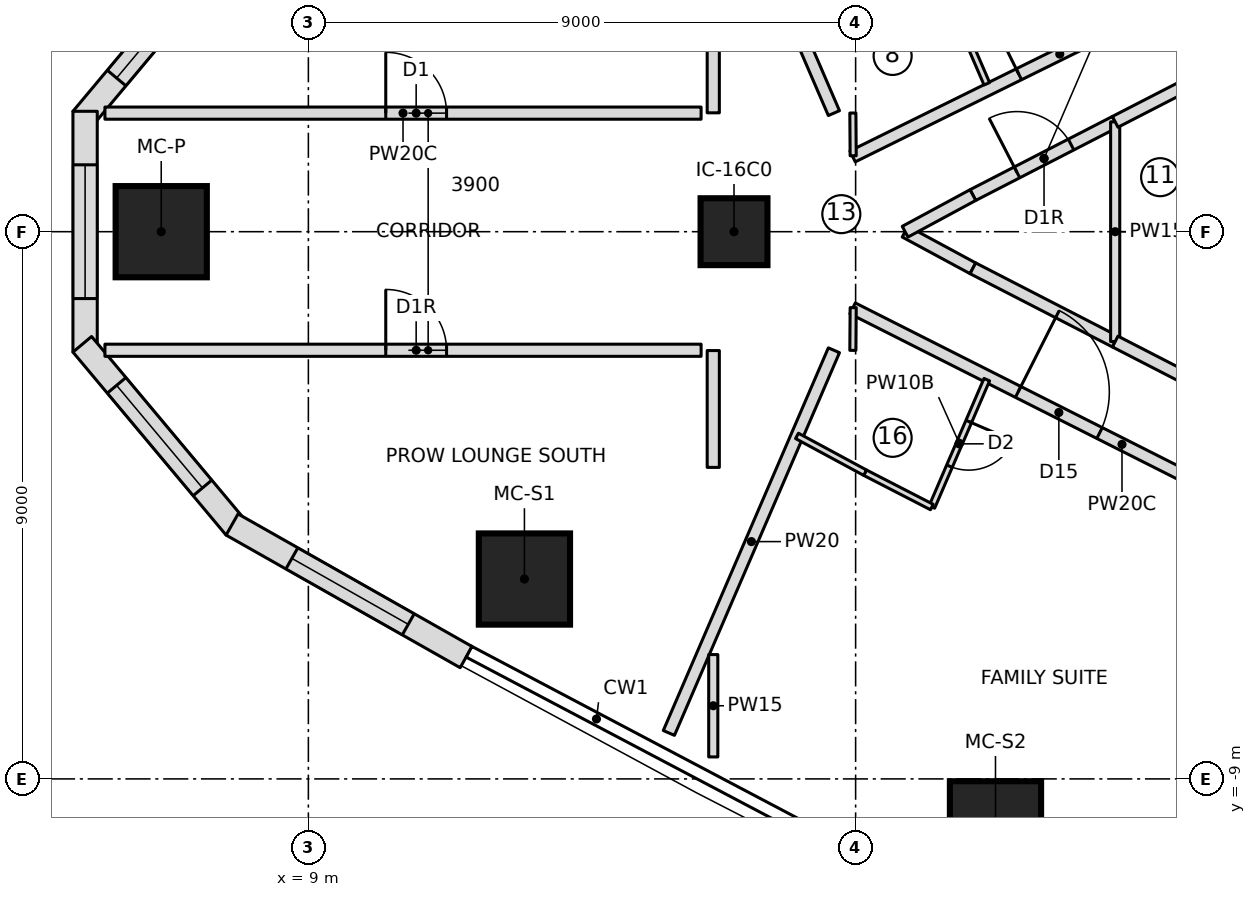
"""IFC4 building model, lengths in metres.
Left out: names, types, materials, properties, quantities, classifications, styles, units other than length and angle.
Written with IfcOpenShell. Run it as: python <this file> out.ifc"""

import sys

from ifc_helpers import new_model, si_unit, direction, frame, frame_2d, origin, origin_2d, place, context, subcontext, project, spatial, polyline, rectangle, outline, extrude, element, fill, save


model = new_model("IFC4")
c1 = context("Model", 3, precision=1e-05, world=origin(), true_north=direction((0.0, 1.0)))
c2 = subcontext(c1, "Body", "Model", "MODEL_VIEW")
j1 = project(units=[si_unit("LENGTHUNIT", "METRE"), si_unit("PLANEANGLEUNIT", "RADIAN")], contexts=[c1])
p1 = place(None, origin())
s1 = spatial("IfcSite", under=j1, at=p1, CompositionType="ELEMENT")
p2 = place(p1, origin())
s2 = spatial("IfcBuilding", under=s1, at=p2, CompositionType="ELEMENT")
p3 = place(p2, frame((0.0, 0.0, 130.2)))
s3 = spatial("IfcBuildingStorey", under=s2, at=p3, CompositionType="ELEMENT", Elevation=130.2)
for number, where, z_axis, x_axis in (
    (1, (6.58, 0.0, 0.0), (0.0, 0.0, 1.0), (1.0, 0.0, 0.0)),
    (2, (12.553, -5.713, 0.0), (0.0, 0.0, 1.0), (1.0, 0.0, 0.0)),
    (3, (20.3, -9.788, 0.0), (0.0, 0.0, 1.0), (1.0, 0.0, 0.0)),
):
    element("IfcColumn", number, at=place(p3, frame(where, z_axis=z_axis, x_axis=x_axis)), inside=s3, PredefinedType="COLUMN", context=c2, shape_type="SweptSolid", body=[
        extrude(rectangle(XDim=1.5, YDim=1.5, at=origin_2d()), origin(), (0.0, 0.0, 1.0), 3.55),
    ])
p4 = place(p3, frame((16.0, 0.0, 0.0), z_axis=(0.0, 0.0, 1.0), x_axis=(1.0, 0.0, 0.0)))
e4 = element("IfcColumn", 4, at=p4, inside=s3, PredefinedType="COLUMN", context=c2, shape_type="SweptSolid", body=[
    extrude(rectangle(XDim=1.1, YDim=1.1, at=origin_2d()), origin(), (0.0, 0.0, 1.0), 3.55),
])
p5 = place(p3, frame((7.777, 4.834, 0.0), z_axis=(0.0, 0.0, 1.0), x_axis=(-0.641787918235, -0.766882173484, 0.0)))
e5 = element("IfcWall", 5, at=p5, inside=s3, PredefinedType="NOTDEFINED", context=c2, shape_type="SweptSolid", body=[
    extrude(outline(polyline([(-0.036, -0.2), (3.888, -0.2), (3.743, 0.2), (0.036, 0.2), (-0.036, -0.2)])), origin(), (0.0, 0.0, 1.0), 3.25),
])
p6 = place(p5, frame((0.808, 0.0, 0.6)))
e6 = element("IfcOpeningElement", 6, at=p6, cuts=e5, PredefinedType="OPENING", context=c2, shape_type="SweptSolid", body=[
    extrude(outline(polyline([(0.0, 1.35), (0.084, 1.771), (0.322, 2.128), (0.679, 2.366), (1.1, 2.45), (1.521, 2.366), (1.878, 2.128), (2.116, 1.771), (2.2, 1.35), (2.2, 1.1), (2.116, 0.679), (1.878, 0.322), (1.521, 0.084), (1.1, 0.0), (0.679, 0.084), (0.322, 0.322), (0.084, 0.679), (0.0, 1.1), (0.0, 1.35)])), frame((0.0, 0.21, 0.0), z_axis=(0.0, -1.0, 0.0), x_axis=(1.0, 0.0, 0.0)), (0.0, 0.0, 1.0), 0.42),
])
p7 = place(p3, frame((5.328, 1.908, 0.0), z_axis=(0.0, 0.0, 1.0), x_axis=(0.0, -1.0, 0.0)))
e7 = element("IfcWall", 7, at=p7, inside=s3, PredefinedType="NOTDEFINED", context=c2, shape_type="SweptSolid", body=[
    extrude(outline(polyline([(-0.073, -0.2), (3.888, -0.2), (3.743, 0.2), (0.073, 0.2), (-0.073, -0.2)])), origin(), (0.0, 0.0, 1.0), 3.25),
])
p8 = place(p7, frame((0.808, 0.0, 0.6)))
e8 = element("IfcOpeningElement", 8, at=p8, cuts=e7, PredefinedType="OPENING", context=c2, shape_type="SweptSolid", body=[
    extrude(outline(polyline([(0.0, 1.35), (0.084, 1.771), (0.322, 2.128), (0.679, 2.366), (1.1, 2.45), (1.521, 2.366), (1.878, 2.128), (2.116, 1.771), (2.2, 1.35), (2.2, 1.1), (2.116, 0.679), (1.878, 0.322), (1.521, 0.084), (1.1, 0.0), (0.679, 0.084), (0.322, 0.322), (0.084, 0.679), (0.0, 1.1), (0.0, 1.35)])), frame((0.0, 0.21, 0.0), z_axis=(0.0, -1.0, 0.0), x_axis=(1.0, 0.0, 0.0)), (0.0, 0.0, 1.0), 0.42),
])
p9 = place(p3, frame((5.328, -1.908, 0.0), z_axis=(0.0, 0.0, 1.0), x_axis=(0.641787918235, -0.766882173484, 0.0)))
e9 = element("IfcWall", 9, at=p9, inside=s3, PredefinedType="NOTDEFINED", context=c2, shape_type="SweptSolid", body=[
    extrude(outline(polyline([(-0.073, -0.2), (3.852, -0.2), (3.779, 0.2), (0.073, 0.2), (-0.073, -0.2)])), origin(), (0.0, 0.0, 1.0), 3.25),
])
p10 = place(p9, frame((0.808, 0.0, 0.6)))
e10 = element("IfcOpeningElement", 10, at=p10, cuts=e9, PredefinedType="OPENING", context=c2, shape_type="SweptSolid", body=[
    extrude(outline(polyline([(0.0, 1.35), (0.084, 1.771), (0.322, 2.128), (0.679, 2.366), (1.1, 2.45), (1.521, 2.366), (1.878, 2.128), (2.116, 1.771), (2.2, 1.35), (2.2, 1.1), (2.116, 0.679), (1.878, 0.322), (1.521, 0.084), (1.1, 0.0), (0.679, 0.084), (0.322, 0.322), (0.084, 0.679), (0.0, 1.1), (0.0, 1.35)])), frame((0.0, 0.21, 0.0), z_axis=(0.0, -1.0, 0.0), x_axis=(1.0, 0.0, 0.0)), (0.0, 0.0, 1.0), 0.42),
])
p11 = place(p3, frame((7.777, -4.834, 0.0), z_axis=(0.0, 0.0, 1.0), x_axis=(0.870045255208, -0.492971859125, 0.0)))
e11 = element("IfcWall", 11, at=p11, inside=s3, PredefinedType="NOTDEFINED", context=c2, shape_type="SweptSolid", body=[
    extrude(outline(polyline([(-0.036, -0.2), (4.388, -0.2), (4.388, 0.2), (0.036, 0.2), (-0.036, -0.2)])), origin(), (0.0, 0.0, 1.0), 3.25),
])
p12 = place(p11, frame((1.094, 0.0, 0.6)))
e12 = element("IfcOpeningElement", 12, at=p12, cuts=e11, PredefinedType="OPENING", context=c2, shape_type="SweptSolid", body=[
    extrude(outline(polyline([(0.0, 1.35), (0.084, 1.771), (0.322, 2.128), (0.679, 2.366), (1.1, 2.45), (1.521, 2.366), (1.878, 2.128), (2.116, 1.771), (2.2, 1.35), (2.2, 1.1), (2.116, 0.679), (1.878, 0.322), (1.521, 0.084), (1.1, 0.0), (0.679, 0.084), (0.322, 0.322), (0.084, 0.679), (0.0, 1.1), (0.0, 1.35)])), frame((0.0, 0.21, 0.0), z_axis=(0.0, -1.0, 0.0), x_axis=(1.0, 0.0, 0.0)), (0.0, 0.0, 1.0), 0.42),
])
p13 = place(p3, frame((5.654, 1.95, 0.0), z_axis=(0.0, 0.0, 1.0), x_axis=(1.0, 0.0, 0.0)))
e13 = element("IfcWall", 13, at=p13, inside=s3, PredefinedType="PARTITIONING", context=c2, shape_type="SweptSolid", body=[
    extrude(rectangle(XDim=9.804, YDim=0.2, at=frame_2d((4.902, 0.0))), origin(), (0.0, 0.0, 1.0), 3.25),
])
p14 = place(p13, frame((4.618, 0.0, 0.0)))
e14 = element("IfcOpeningElement", 14, at=p14, cuts=e13, PredefinedType="OPENING", context=c2, shape_type="SweptSolid", body=[
    extrude(rectangle(XDim=1.0, YDim=2.1, at=frame_2d((0.5, 1.05))), frame((0.0, 0.11, 0.0), z_axis=(0.0, -1.0, 0.0), x_axis=(1.0, 0.0, 0.0)), (0.0, 0.0, 1.0), 0.22),
])
p15 = place(p3, frame((5.654, -1.95, 0.0), z_axis=(0.0, 0.0, 1.0), x_axis=(1.0, 0.0, 0.0)))
e15 = element("IfcWall", 15, at=p15, inside=s3, PredefinedType="PARTITIONING", context=c2, shape_type="SweptSolid", body=[
    extrude(rectangle(XDim=9.804, YDim=0.2, at=frame_2d((4.902, 0.0))), origin(), (0.0, 0.0, 1.0), 3.25),
])
p16 = place(p15, frame((4.618, 0.0, 0.0)))
e16 = element("IfcOpeningElement", 16, at=p16, cuts=e15, PredefinedType="OPENING", context=c2, shape_type="SweptSolid", body=[
    extrude(rectangle(XDim=1.0, YDim=2.1, at=frame_2d((0.5, 1.05))), frame((0.0, 0.11, 0.0), z_axis=(0.0, -1.0, 0.0), x_axis=(1.0, 0.0, 0.0)), (0.0, 0.0, 1.0), 0.22),
])
p17 = place(p3, frame((17.643, 1.95, 0.0), z_axis=(0.0, 0.0, 1.0), x_axis=(-0.395994543879, 0.918252863441, 0.0)))
e17 = element("IfcWall", 17, at=p17, inside=s3, PredefinedType="PARTITIONING", context=c2, shape_type="SweptSolid", body=[
    extrude(rectangle(XDim=6.854, YDim=0.2, at=frame_2d((3.427, 0.0))), origin(), (0.0, 0.0, 1.0), 3.25),
])
p18 = place(p3, frame((17.95, 1.238, 0.0), z_axis=(0.0, 0.0, 1.0), x_axis=(0.896593504408, 0.44285447706, 0.0)))
e18 = element("IfcWall", 18, at=p18, inside=s3, PredefinedType="PARTITIONING", context=c2, shape_type="SweptSolid", body=[
    extrude(rectangle(XDim=14.31, YDim=0.2, at=frame_2d((7.155, 0.0))), origin(), (0.0, 0.0, 1.0), 3.25),
])
p19 = place(p18, frame((3.05, 0.0, 0.0)))
e19 = element("IfcOpeningElement", 19, at=p19, cuts=e18, PredefinedType="OPENING", context=c2, shape_type="SweptSolid", body=[
    extrude(rectangle(XDim=1.5, YDim=2.1, at=frame_2d((0.75, 1.05))), frame((0.0, 0.11, 0.0), z_axis=(0.0, -1.0, 0.0), x_axis=(1.0, 0.0, 0.0)), (0.0, 0.0, 1.0), 0.22),
])
p20 = place(p3, frame((19.254, 4.529, 0.0), z_axis=(0.0, 0.0, 1.0), x_axis=(0.395958457437, -0.9182684248, 0.0)))
e20 = element("IfcWall", 20, at=p20, inside=s3, PredefinedType="PARTITIONING", context=c2, shape_type="SweptSolid", body=[
    extrude(rectangle(XDim=2.282, YDim=0.1, at=frame_2d((1.141, 0.0))), origin(), (0.0, 0.0, 1.0), 3.25),
])
p21 = place(p20, frame((0.75, 0.0, 0.0)))
e21 = element("IfcOpeningElement", 21, at=p21, cuts=e20, PredefinedType="OPENING", context=c2, shape_type="SweptSolid", body=[
    extrude(rectangle(XDim=0.8, YDim=2.1, at=frame_2d((0.4, 1.05))), frame((0.0, 0.06, 0.0), z_axis=(0.0, -1.0, 0.0), x_axis=(1.0, 0.0, 0.0)), (0.0, 0.0, 1.0), 0.12),
])
p22 = place(p3, frame((14.929, -8.244, 0.0), z_axis=(0.0, 0.0, 1.0), x_axis=(0.395994543879, 0.918252863441, 0.0)))
e22 = element("IfcWall", 22, at=p22, inside=s3, PredefinedType="PARTITIONING", context=c2, shape_type="SweptSolid", body=[
    extrude(rectangle(XDim=6.854, YDim=0.2, at=frame_2d((3.427, 0.0))), origin(), (0.0, 0.0, 1.0), 3.25),
])
p23 = place(p3, frame((17.95, -1.261, 0.0), z_axis=(0.0, 0.0, 1.0), x_axis=(0.892679126003, -0.450692775623, 0.0)))
e23 = element("IfcWall", 23, at=p23, inside=s3, PredefinedType="PARTITIONING", context=c2, shape_type="SweptSolid", body=[
    extrude(rectangle(XDim=9.927, YDim=0.2, at=frame_2d((4.963, 0.0))), origin(), (0.0, 0.0, 1.0), 3.25),
])
p24 = place(p23, frame((3.05, 0.0, 0.0)))
e24 = element("IfcOpeningElement", 24, at=p24, cuts=e23, PredefinedType="OPENING", context=c2, shape_type="SweptSolid", body=[
    extrude(rectangle(XDim=1.5, YDim=2.1, at=frame_2d((0.75, 1.05))), frame((0.0, 0.11, 0.0), z_axis=(0.0, -1.0, 0.0), x_axis=(1.0, 0.0, 0.0)), (0.0, 0.0, 1.0), 0.22),
])
p25 = place(p3, frame((20.157, -2.433, 0.0), z_axis=(0.0, 0.0, 1.0), x_axis=(-0.395958457437, -0.9182684248, 0.0)))
e25 = element("IfcWall", 25, at=p25, inside=s3, PredefinedType="PARTITIONING", context=c2, shape_type="SweptSolid", body=[
    extrude(rectangle(XDim=2.282, YDim=0.1, at=frame_2d((1.141, 0.0))), origin(), (0.0, 0.0, 1.0), 3.25),
])
p26 = place(p25, frame((0.75, 0.0, 0.0)))
e26 = element("IfcOpeningElement", 26, at=p26, cuts=e25, PredefinedType="OPENING", context=c2, shape_type="SweptSolid", body=[
    extrude(rectangle(XDim=0.8, YDim=2.1, at=frame_2d((0.4, 1.05))), frame((0.0, 0.06, 0.0), z_axis=(0.0, -1.0, 0.0), x_axis=(1.0, 0.0, 0.0)), (0.0, 0.0, 1.0), 0.12),
])
p27 = place(p3, frame((19.253, -4.529, 0.0), z_axis=(0.0, 0.0, 1.0), x_axis=(-0.889106231322, 0.457700895154, 0.0)))
e27 = element("IfcWall", 27, at=p27, inside=s3, PredefinedType="PARTITIONING", context=c2, shape_type="SweptSolid", body=[
    extrude(rectangle(XDim=1.235, YDim=0.1, at=frame_2d((0.617, 0.0))), origin(), (0.0, 0.0, 1.0), 3.25),
])
p28 = place(p3, frame((18.156, -3.963, 0.0), z_axis=(0.0, 0.0, 1.0), x_axis=(-0.879823588489, 0.475300382009, 0.0)))
e28 = element("IfcWall", 28, at=p28, inside=s3, PredefinedType="PARTITIONING", context=c2, shape_type="SweptSolid", body=[
    extrude(rectangle(XDim=1.273, YDim=0.1, at=frame_2d((0.636, 0.0))), origin(), (0.0, 0.0, 1.0), 3.25),
])
p29 = place(p3, frame((19.928, 0.602, 0.0), z_axis=(0.0, 0.0, 1.0), x_axis=(0.889134700325, 0.457645588505, 0.0)))
e29 = element("IfcWall", 29, at=p29, inside=s3, PredefinedType="PARTITIONING", context=c2, shape_type="SweptSolid", body=[
    extrude(rectangle(XDim=2.632, YDim=0.2, at=frame_2d((1.316, 0.0))), origin(), (0.0, 0.0, 1.0), 3.25),
])
p30 = place(p29, frame((0.816, 0.0, 0.0)))
e30 = element("IfcOpeningElement", 30, at=p30, cuts=e29, PredefinedType="OPENING", context=c2, shape_type="SweptSolid", body=[
    extrude(rectangle(XDim=1.0, YDim=2.1, at=frame_2d((0.5, 1.05))), frame((0.0, 0.11, 0.0), z_axis=(0.0, -1.0, 0.0), x_axis=(1.0, 0.0, 0.0)), (0.0, 0.0, 1.0), 0.22),
])
for number, where, z_axis, x_axis in (
    (31, (19.928, -0.602, 0.0), (0.0, 0.0, 1.0), (-0.88, 0.475, 0.0)),
    (32, (18.814, 0.0, 0.0), (0.0, 0.0, 1.0), (0.88, 0.475, 0.0)),
):
    element("IfcWall", number, at=place(p3, frame(where, z_axis=z_axis, x_axis=x_axis)), inside=s3, PredefinedType="PARTITIONING", context=c2, shape_type="SweptSolid", body=[
        extrude(rectangle(XDim=1.267, YDim=0.2, at=frame_2d((0.633, 0.0))), origin(), (0.0, 0.0, 1.0), 3.25),
    ])
p31 = place(p3, frame((22.269, -1.807, 0.0), z_axis=(0.0, 0.0, 1.0), x_axis=(-0.889134700325, 0.457645588505, 0.0)))
e33 = element("IfcWall", 33, at=p31, inside=s3, PredefinedType="PARTITIONING", context=c2, shape_type="SweptSolid", body=[
    extrude(rectangle(XDim=2.632, YDim=0.2, at=frame_2d((1.316, 0.0))), origin(), (0.0, 0.0, 1.0), 3.25),
])
p32 = place(p3, frame((22.269, -1.807, 0.0), z_axis=(0.0, 0.0, 1.0), x_axis=(0.0, 1.0, 0.0)))
e34 = element("IfcWall", 34, at=p32, inside=s3, PredefinedType="PARTITIONING", context=c2, shape_type="SweptSolid", body=[
    extrude(rectangle(XDim=3.613, YDim=0.15, at=frame_2d((1.807, 0.0))), origin(), (0.0, 0.0, 1.0), 3.25),
])
for number, where, z_axis, x_axis in (
    (35, (23.659, -2.522, 0.0), (0.0, 0.0, 1.0), (-0.889, 0.458, 0.0)),
    (36, (22.269, 1.807, 0.0), (0.0, 0.0, 1.0), (0.889, 0.458, 0.0)),
):
    element("IfcWall", number, at=place(p3, frame(where, z_axis=z_axis, x_axis=x_axis)), inside=s3, PredefinedType="PARTITIONING", context=c2, shape_type="SweptSolid", body=[
        extrude(rectangle(XDim=1.563, YDim=0.2, at=frame_2d((0.782, 0.0))), origin(), (0.0, 0.0, 1.0), 3.25),
    ])
p33 = place(p3, frame((15.659, -6.955, 0.0), z_axis=(0.0, 0.0, 1.0), x_axis=(0.0, -1.0, 0.0)))
e37 = element("IfcWall", 37, at=p33, inside=s3, PredefinedType="PARTITIONING", context=c2, shape_type="SweptSolid", body=[
    extrude(rectangle(XDim=1.684, YDim=0.15, at=frame_2d((0.842, 0.0))), origin(), (0.0, 0.0, 1.0), 3.25),
])
for number, where, z_axis, x_axis in (
    (38, (17.96, 1.249, 0.0), (0.0, 0.0, 1.0), (-0.007, 1.0, 0.0)),
    (39, (17.955, -1.952, 0.0), (0.0, 0.0, 1.0), (0.007, 1.0, 0.0)),
):
    element("IfcWall", number, at=place(p3, frame(where, z_axis=z_axis, x_axis=x_axis)), inside=s3, PredefinedType="PARTITIONING", context=c2, shape_type="SweptSolid", body=[
        extrude(rectangle(XDim=0.703, YDim=0.1, at=frame_2d((0.352, 0.0))), origin(), (0.0, 0.0, 1.0), 3.25),
    ])
p34 = place(p3, frame((15.659, 3.869, 0.0), z_axis=(0.0, 0.0, 1.0), x_axis=(0.0, -1.0, 0.0)))
e40 = element("IfcWall", 40, at=p34, inside=s3, PredefinedType="PARTITIONING", context=c2, shape_type="SweptSolid", body=[
    extrude(rectangle(XDim=1.914, YDim=0.2, at=frame_2d((0.957, 0.0))), origin(), (0.0, 0.0, 1.0), 3.25),
])
p35 = place(p3, frame((15.659, -1.955, 0.0), z_axis=(0.0, 0.0, 1.0), x_axis=(0.0, -1.0, 0.0)))
e41 = element("IfcWall", 41, at=p35, inside=s3, PredefinedType="PARTITIONING", context=c2, shape_type="SweptSolid", body=[
    extrude(rectangle(XDim=1.922, YDim=0.2, at=frame_2d((0.961, 0.0))), origin(), (0.0, 0.0, 1.0), 3.25),
])
p36 = place(p6, origin())
e42 = element("IfcWindow", 42, at=p36, inside=s3, PartitioningType="SINGLE_PANEL", PredefinedType="WINDOW", context=c2, shape_type="SweptSolid", body=[
    extrude(outline(polyline([(0.0, 1.35), (0.084, 1.771), (0.322, 2.128), (0.679, 2.366), (1.1, 2.45), (1.521, 2.366), (1.878, 2.128), (2.116, 1.771), (2.2, 1.35), (2.2, 1.1), (2.116, 0.679), (1.878, 0.322), (1.521, 0.084), (1.1, 0.0), (0.679, 0.084), (0.322, 0.322), (0.084, 0.679), (0.0, 1.1), (0.0, 1.35)])), frame((0.0, 0.17, 0.0), z_axis=(0.0, -1.0, 0.0), x_axis=(1.0, 0.0, 0.0)), (0.0, 0.0, 1.0), 0.06),
])
fill(e6, e42)
p37 = place(p8, origin())
e43 = element("IfcWindow", 43, at=p37, inside=s3, PartitioningType="SINGLE_PANEL", PredefinedType="WINDOW", context=c2, shape_type="SweptSolid", body=[
    extrude(outline(polyline([(0.0, 1.35), (0.084, 1.771), (0.322, 2.128), (0.679, 2.366), (1.1, 2.45), (1.521, 2.366), (1.878, 2.128), (2.116, 1.771), (2.2, 1.35), (2.2, 1.1), (2.116, 0.679), (1.878, 0.322), (1.521, 0.084), (1.1, 0.0), (0.679, 0.084), (0.322, 0.322), (0.084, 0.679), (0.0, 1.1), (0.0, 1.35)])), frame((0.0, 0.17, 0.0), z_axis=(0.0, -1.0, 0.0), x_axis=(1.0, 0.0, 0.0)), (0.0, 0.0, 1.0), 0.06),
])
fill(e8, e43)
p38 = place(p10, origin())
e44 = element("IfcWindow", 44, at=p38, inside=s3, PartitioningType="SINGLE_PANEL", PredefinedType="WINDOW", context=c2, shape_type="SweptSolid", body=[
    extrude(outline(polyline([(0.0, 1.35), (0.084, 1.771), (0.322, 2.128), (0.679, 2.366), (1.1, 2.45), (1.521, 2.366), (1.878, 2.128), (2.116, 1.771), (2.2, 1.35), (2.2, 1.1), (2.116, 0.679), (1.878, 0.322), (1.521, 0.084), (1.1, 0.0), (0.679, 0.084), (0.322, 0.322), (0.084, 0.679), (0.0, 1.1), (0.0, 1.35)])), frame((0.0, 0.17, 0.0), z_axis=(0.0, -1.0, 0.0), x_axis=(1.0, 0.0, 0.0)), (0.0, 0.0, 1.0), 0.06),
])
fill(e10, e44)
p39 = place(p12, origin())
e45 = element("IfcWindow", 45, at=p39, inside=s3, PartitioningType="SINGLE_PANEL", PredefinedType="WINDOW", context=c2, shape_type="SweptSolid", body=[
    extrude(outline(polyline([(0.0, 1.35), (0.084, 1.771), (0.322, 2.128), (0.679, 2.366), (1.1, 2.45), (1.521, 2.366), (1.878, 2.128), (2.116, 1.771), (2.2, 1.35), (2.2, 1.1), (2.116, 0.679), (1.878, 0.322), (1.521, 0.084), (1.1, 0.0), (0.679, 0.084), (0.322, 0.322), (0.084, 0.679), (0.0, 1.1), (0.0, 1.35)])), frame((0.0, 0.17, 0.0), z_axis=(0.0, -1.0, 0.0), x_axis=(1.0, 0.0, 0.0)), (0.0, 0.0, 1.0), 0.06),
])
fill(e12, e45)
p40 = place(p14, origin())
e46 = element("IfcDoor", 46, at=p40, inside=s3, OperationType="SINGLE_SWING_LEFT", PredefinedType="DOOR", context=c2, shape_type="SweptSolid", body=[
    extrude(rectangle(XDim=1.0, YDim=2.1, at=frame_2d((0.5, 1.05))), frame((0.0, 0.025, 0.0), z_axis=(0.0, -1.0, 0.0), x_axis=(1.0, 0.0, 0.0)), (0.0, 0.0, 1.0), 0.05),
])
fill(e14, e46)
p41 = place(p16, origin())
e47 = element("IfcDoor", 47, at=p41, inside=s3, OperationType="SINGLE_SWING_RIGHT", PredefinedType="DOOR", context=c2, shape_type="SweptSolid", body=[
    extrude(rectangle(XDim=1.0, YDim=2.1, at=frame_2d((0.5, 1.05))), frame((0.0, 0.025, 0.0), z_axis=(0.0, -1.0, 0.0), x_axis=(1.0, 0.0, 0.0)), (0.0, 0.0, 1.0), 0.05),
])
fill(e16, e47)
p42 = place(p19, origin())
e48 = element("IfcDoor", 48, at=p42, inside=s3, OperationType="DOUBLE_DOOR_SINGLE_SWING", PredefinedType="DOOR", context=c2, shape_type="SweptSolid", body=[
    extrude(rectangle(XDim=1.5, YDim=2.1, at=frame_2d((0.75, 1.05))), frame((0.0, 0.025, 0.0), z_axis=(0.0, -1.0, 0.0), x_axis=(1.0, 0.0, 0.0)), (0.0, 0.0, 1.0), 0.05),
])
fill(e19, e48)
p43 = place(p26, origin())
e49 = element("IfcDoor", 49, at=p43, inside=s3, OperationType="SINGLE_SWING_LEFT", PredefinedType="DOOR", context=c2, shape_type="SweptSolid", body=[
    extrude(rectangle(XDim=0.8, YDim=2.1, at=frame_2d((0.4, 1.05))), frame((0.0, 0.025, 0.0), z_axis=(0.0, -1.0, 0.0), x_axis=(1.0, 0.0, 0.0)), (0.0, 0.0, 1.0), 0.05),
])
fill(e26, e49)
p44 = place(p24, origin())
e50 = element("IfcDoor", 50, at=p44, inside=s3, OperationType="DOUBLE_DOOR_SINGLE_SWING", PredefinedType="DOOR", context=c2, shape_type="SweptSolid", body=[
    extrude(rectangle(XDim=1.5, YDim=2.1, at=frame_2d((0.75, 1.05))), frame((0.0, 0.025, 0.0), z_axis=(0.0, -1.0, 0.0), x_axis=(1.0, 0.0, 0.0)), (0.0, 0.0, 1.0), 0.05),
])
fill(e24, e50)
p45 = place(p30, origin())
e51 = element("IfcDoor", 51, at=p45, inside=s3, OperationType="SINGLE_SWING_RIGHT", PredefinedType="DOOR", context=c2, shape_type="SweptSolid", body=[
    extrude(rectangle(XDim=1.0, YDim=2.1, at=frame_2d((0.5, 1.05))), frame((0.0, 0.025, 0.0), z_axis=(0.0, -1.0, 0.0), x_axis=(1.0, 0.0, 0.0)), (0.0, 0.0, 1.0), 0.05),
])
fill(e30, e51)
save(model, sys.argv[1])
